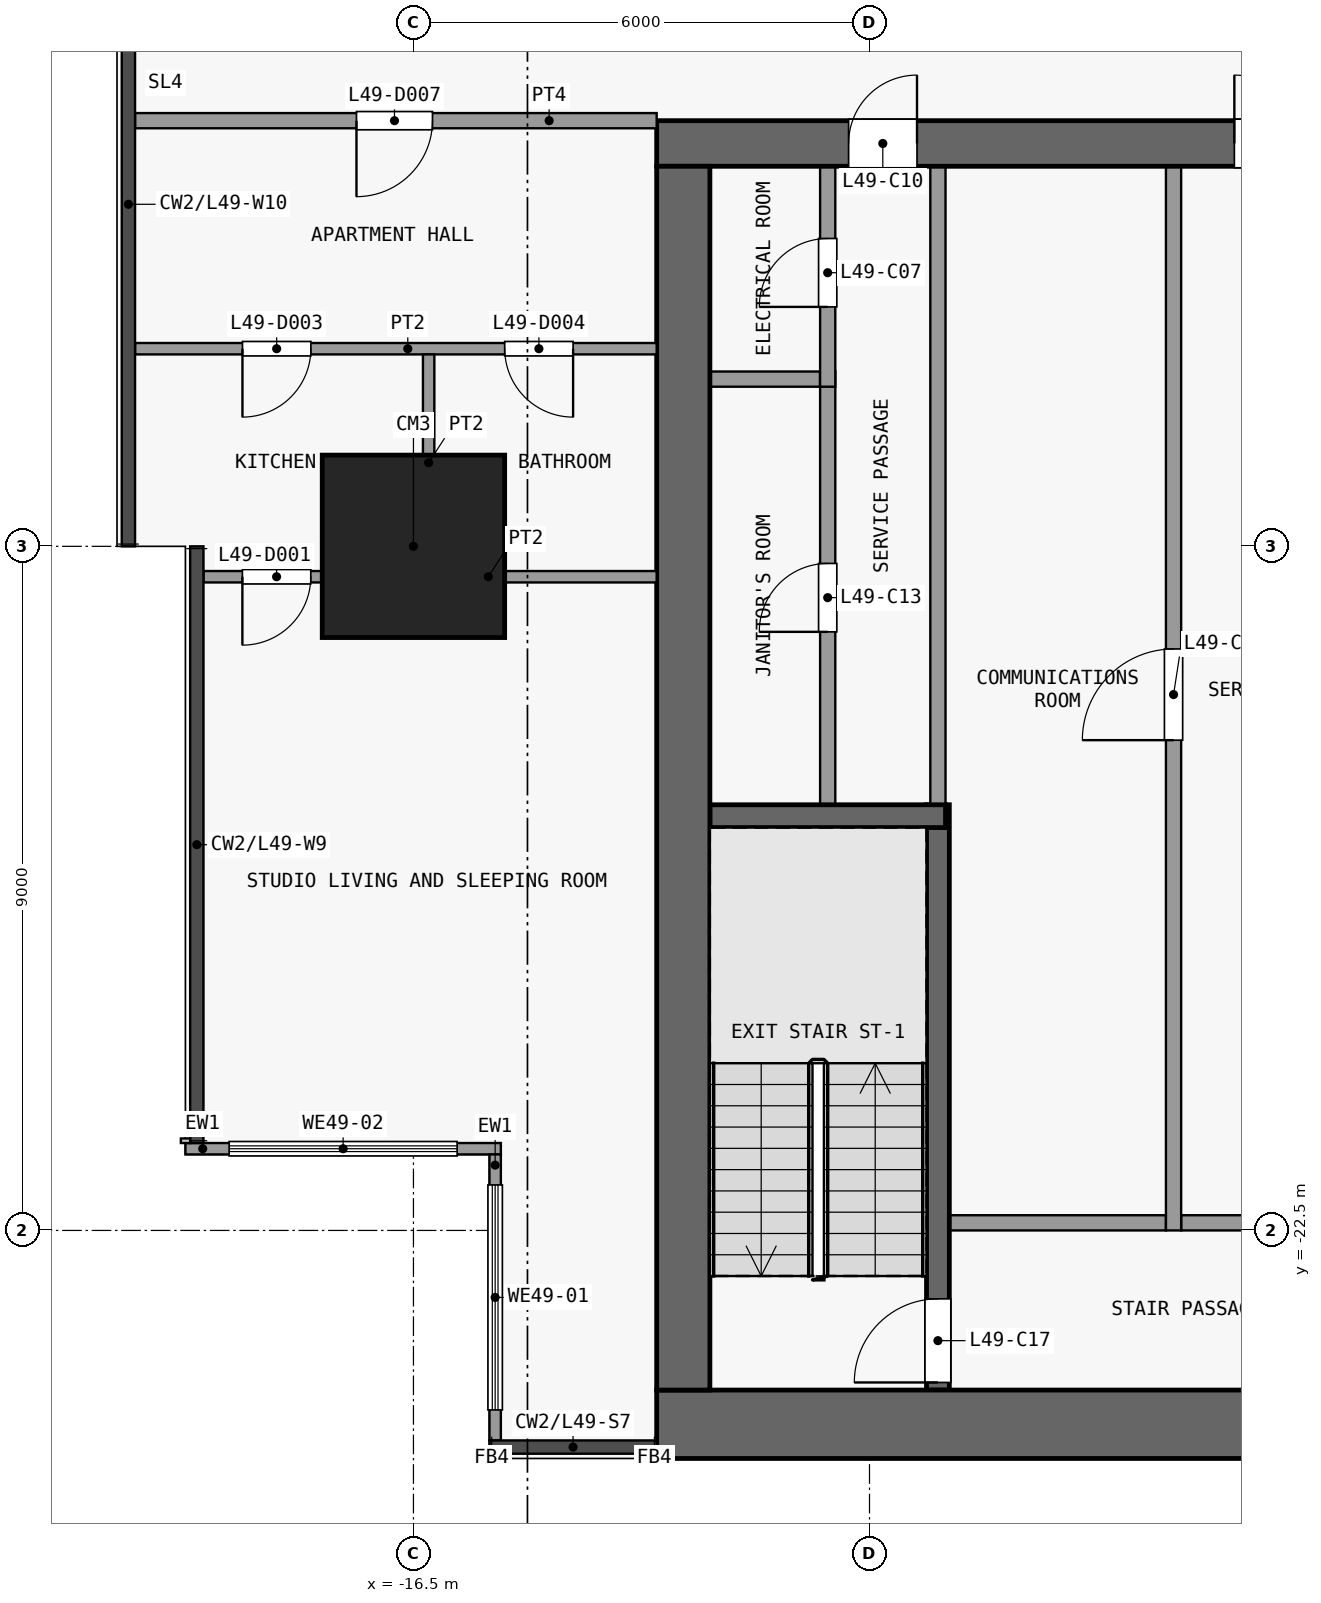
"""IFC4 building model, lengths in metres.
Left out: names, types, materials, properties, quantities, classifications, styles, units other than length and angle.
Written with IfcOpenShell. Run it as: python <this file> out.ifc"""

import sys

from ifc_helpers import new_model, si_unit, direction, frame, frame_2d, origin, origin_2d, place, context, subcontext, project, spatial, rectangle, extrude, element, fill, save


model = new_model("IFC4")
c1 = context("Model", 3, precision=1e-05, world=origin(), true_north=direction((0.0, 1.0)))
c2 = subcontext(c1, "Body", "Model", "MODEL_VIEW")
j1 = project(units=[si_unit("LENGTHUNIT", "METRE"), si_unit("PLANEANGLEUNIT", "RADIAN")], contexts=[c1])
p1 = place(None, origin())
s1 = spatial("IfcSite", under=j1, at=p1, CompositionType="ELEMENT")
p2 = place(p1, origin())
s2 = spatial("IfcBuilding", under=s1, at=p2, CompositionType="ELEMENT")
p3 = place(p2, frame((0.0, 0.0, 196.1)))
s3 = spatial("IfcBuildingStorey", under=s2, at=p3, CompositionType="ELEMENT", Elevation=196.1)
p4 = place(p3, frame((-16.5, -13.5, 0.0), z_axis=(0.0, 0.0, 1.0), x_axis=(1.0, 0.0, 0.0)))
e1 = element("IfcColumn", 1, at=p4, inside=s3, PredefinedType="COLUMN", context=c2, shape_type="SweptSolid", body=[
    extrude(rectangle(XDim=2.4, YDim=2.4, at=origin_2d()), origin(), (0.0, 0.0, 1.0), 3.6),
])
p5 = place(p3, frame((-13.3, -25.05, 0.0), z_axis=(0.0, 0.0, 1.0), x_axis=(1.0, 0.0, 0.0)))
e2 = element("IfcWall", 2, at=p5, inside=s3, PredefinedType="SHEAR", context=c2, shape_type="SweptSolid", body=[
    extrude(rectangle(XDim=26.6, YDim=0.9, at=frame_2d((13.3, 0.0))), origin(), (0.0, 0.0, 1.0), 3.15),
])
p6 = place(p3, frame((-13.3, -8.2, 0.0), z_axis=(0.0, 0.0, 1.0), x_axis=(1.0, 0.0, 0.0)))
e3 = element("IfcWall", 3, at=p6, inside=s3, PredefinedType="SHEAR", context=c2, shape_type="SweptSolid", body=[
    extrude(rectangle(XDim=26.6, YDim=0.6, at=frame_2d((13.3, 0.0))), origin(), (0.0, 0.0, 1.0), 3.15),
])
p7 = place(p6, frame((7.6, 0.0, 0.0)))
e4 = element("IfcOpeningElement", 4, at=p7, cuts=e3, PredefinedType="OPENING", context=c2, shape_type="SweptSolid", body=[
    extrude(rectangle(XDim=1.8, YDim=2.1, at=frame_2d((0.9, 1.05))), frame((0.0, 0.31, 0.0), z_axis=(0.0, -1.0, 0.0), x_axis=(1.0, 0.0, 0.0)), (0.0, 0.0, 1.0), 0.62),
])
p8 = place(p6, frame((17.2, 0.0, 0.0)))
e5 = element("IfcOpeningElement", 5, at=p8, cuts=e3, PredefinedType="OPENING", context=c2, shape_type="SweptSolid", body=[
    extrude(rectangle(XDim=1.8, YDim=2.1, at=frame_2d((0.9, 1.05))), frame((0.0, 0.31, 0.0), z_axis=(0.0, -1.0, 0.0), x_axis=(1.0, 0.0, 0.0)), (0.0, 0.0, 1.0), 0.62),
])
p9 = place(p6, frame((2.525, 0.0, 0.0)))
e6 = element("IfcOpeningElement", 6, at=p9, cuts=e3, PredefinedType="OPENING", context=c2, shape_type="SweptSolid", body=[
    extrude(rectangle(XDim=0.9, YDim=2.1, at=frame_2d((0.45, 1.05))), frame((0.0, 0.31, 0.0), z_axis=(0.0, -1.0, 0.0), x_axis=(1.0, 0.0, 0.0)), (0.0, 0.0, 1.0), 0.62),
])
p10 = place(p6, frame((23.175, 0.0, 0.0)))
e7 = element("IfcOpeningElement", 7, at=p10, cuts=e3, PredefinedType="OPENING", context=c2, shape_type="SweptSolid", body=[
    extrude(rectangle(XDim=0.9, YDim=2.1, at=frame_2d((0.45, 1.05))), frame((0.0, 0.31, 0.0), z_axis=(0.0, -1.0, 0.0), x_axis=(1.0, 0.0, 0.0)), (0.0, 0.0, 1.0), 0.62),
])
p11 = place(p3, frame((-12.95, -24.6, 0.0), z_axis=(0.0, 0.0, 1.0), x_axis=(0.0, 1.0, 0.0)))
e8 = element("IfcWall", 8, at=p11, inside=s3, PredefinedType="SHEAR", context=c2, shape_type="SweptSolid", body=[
    extrude(rectangle(XDim=16.1, YDim=0.7, at=frame_2d((8.05, 0.0))), origin(), (0.0, 0.0, 1.0), 3.15),
])
p12 = place(p3, frame((-9.45, -22.4, 0.0), z_axis=(0.0, 0.0, 1.0), x_axis=(1.0, 0.0, 0.0)))
e9 = element("IfcWall", 9, at=p12, inside=s3, PredefinedType="PARTITIONING", context=c2, shape_type="SweptSolid", body=[
    extrude(rectangle(XDim=2.85, YDim=0.2, at=frame_2d((1.425, 0.0))), origin(), (0.0, 0.0, 1.0), 3.15),
])
p13 = place(p3, frame((-3.25, -22.4, 0.0), z_axis=(0.0, 0.0, 1.0), x_axis=(-1.0, 0.0, 0.0)))
e10 = element("IfcWall", 10, at=p13, inside=s3, PredefinedType="PARTITIONING", context=c2, shape_type="SweptSolid", body=[
    extrude(rectangle(XDim=3.15, YDim=0.2, at=frame_2d((1.575, 0.0))), origin(), (0.0, 0.0, 1.0), 3.15),
])
p14 = place(p13, frame((0.8, 0.0, 0.0)))
e11 = element("IfcOpeningElement", 11, at=p14, cuts=e10, PredefinedType="OPENING", context=c2, shape_type="SweptSolid", body=[
    extrude(rectangle(XDim=1.5, YDim=2.1, at=frame_2d((0.75, 1.05))), frame((0.0, 0.11, 0.0), z_axis=(0.0, -1.0, 0.0), x_axis=(1.0, 0.0, 0.0)), (0.0, 0.0, 1.0), 0.22),
])
p15 = place(p3, frame((-12.6, -17.05, 0.0), z_axis=(0.0, 0.0, 1.0), x_axis=(1.0, 0.0, 0.0)))
e12 = element("IfcWall", 12, at=p15, inside=s3, PredefinedType="SHEAR", context=c2, shape_type="SweptSolid", body=[
    extrude(rectangle(XDim=3.1, YDim=0.3, at=frame_2d((1.55, 0.0))), origin(), (0.0, 0.0, 1.0), 3.15),
])
p16 = place(p3, frame((-12.6, -11.3, 0.0), z_axis=(0.0, 0.0, 1.0), x_axis=(1.0, 0.0, 0.0)))
e13 = element("IfcWall", 13, at=p16, inside=s3, PredefinedType="PARTITIONING", context=c2, shape_type="SweptSolid", body=[
    extrude(rectangle(XDim=1.45, YDim=0.2, at=frame_2d((0.725, 0.0))), origin(), (0.0, 0.0, 1.0), 3.15),
])
p17 = place(p3, frame((-11.05, -16.9, 0.0), z_axis=(0.0, 0.0, 1.0), x_axis=(0.0, 1.0, 0.0)))
e14 = element("IfcWall", 14, at=p17, inside=s3, PredefinedType="PARTITIONING", context=c2, shape_type="SweptSolid", body=[
    extrude(rectangle(XDim=5.7, YDim=0.2, at=frame_2d((2.85, 0.0))), origin(), (0.0, 0.0, 1.0), 3.15),
])
p18 = place(p17, frame((2.275, 0.0, 0.0)))
e15 = element("IfcOpeningElement", 15, at=p18, cuts=e14, PredefinedType="OPENING", context=c2, shape_type="SweptSolid", body=[
    extrude(rectangle(XDim=0.9, YDim=2.1, at=frame_2d((0.45, 1.05))), frame((0.0, 0.11, 0.0), z_axis=(0.0, -1.0, 0.0), x_axis=(1.0, 0.0, 0.0)), (0.0, 0.0, 1.0), 0.22),
])
p19 = place(p3, frame((-11.05, -11.4, 0.0), z_axis=(0.0, 0.0, 1.0), x_axis=(0.0, 1.0, 0.0)))
e16 = element("IfcWall", 16, at=p19, inside=s3, PredefinedType="PARTITIONING", context=c2, shape_type="SweptSolid", body=[
    extrude(rectangle(XDim=2.9, YDim=0.2, at=frame_2d((1.45, 0.0))), origin(), (0.0, 0.0, 1.0), 3.15),
])
p20 = place(p19, frame((1.05, 0.0, 0.0)))
e17 = element("IfcOpeningElement", 17, at=p20, cuts=e16, PredefinedType="OPENING", context=c2, shape_type="SweptSolid", body=[
    extrude(rectangle(XDim=0.9, YDim=2.1, at=frame_2d((0.45, 1.05))), frame((0.0, 0.11, 0.0), z_axis=(0.0, -1.0, 0.0), x_axis=(1.0, 0.0, 0.0)), (0.0, 0.0, 1.0), 0.22),
])
p21 = place(p3, frame((-9.6, -24.6, 0.0), z_axis=(0.0, 0.0, 1.0), x_axis=(0.0, 1.0, 0.0)))
e18 = element("IfcWall", 18, at=p21, inside=s3, PredefinedType="SHEAR", context=c2, shape_type="SweptSolid", body=[
    extrude(rectangle(XDim=7.7, YDim=0.3, at=frame_2d((3.85, 0.0))), origin(), (0.0, 0.0, 1.0), 3.15),
])
p22 = place(p21, frame((0.1, 0.0, 0.0)))
e19 = element("IfcOpeningElement", 19, at=p22, cuts=e18, PredefinedType="OPENING", context=c2, shape_type="SweptSolid", body=[
    extrude(rectangle(XDim=1.1, YDim=2.1, at=frame_2d((0.55, 1.05))), frame((0.0, 0.16, 0.0), z_axis=(0.0, -1.0, 0.0), x_axis=(1.0, 0.0, 0.0)), (0.0, 0.0, 1.0), 0.32),
])
p23 = place(p3, frame((-9.6, -16.9, 0.0), z_axis=(0.0, 0.0, 1.0), x_axis=(0.0, 1.0, 0.0)))
e20 = element("IfcWall", 20, at=p23, inside=s3, PredefinedType="PARTITIONING", context=c2, shape_type="SweptSolid", body=[
    extrude(rectangle(XDim=8.4, YDim=0.2, at=frame_2d((4.2, 0.0))), origin(), (0.0, 0.0, 1.0), 3.15),
])
p24 = place(p3, frame((-6.5, -22.5, 0.0), z_axis=(0.0, 0.0, 1.0), x_axis=(0.0, 1.0, 0.0)))
e21 = element("IfcWall", 21, at=p24, inside=s3, PredefinedType="PARTITIONING", context=c2, shape_type="SweptSolid", body=[
    extrude(rectangle(XDim=14.0, YDim=0.2, at=frame_2d((7.0, 0.0))), origin(), (0.0, 0.0, 1.0), 3.15),
])
p25 = place(p24, frame((6.45, 0.0, 0.0)))
e22 = element("IfcOpeningElement", 22, at=p25, cuts=e21, PredefinedType="OPENING", context=c2, shape_type="SweptSolid", body=[
    extrude(rectangle(XDim=1.2, YDim=2.1, at=frame_2d((0.6, 1.05))), frame((0.0, 0.11, 0.0), z_axis=(0.0, -1.0, 0.0), x_axis=(1.0, 0.0, 0.0)), (0.0, 0.0, 1.0), 0.22),
])
p26 = place(p3, frame((-15.425, -25.262, 0.0), z_axis=(0.0, 0.0, 1.0), x_axis=(0.0, 1.0, 0.0)))
e23 = element("IfcWall", 23, at=p26, inside=s3, PredefinedType="SOLIDWALL", context=c2, shape_type="SweptSolid", body=[
    extrude(rectangle(XDim=3.762, YDim=0.15, at=frame_2d((1.881, 0.0))), origin(), (0.0, 0.0, 1.0), 3.15),
])
p27 = place(p26, frame((0.401, 0.0, 0.9)))
e24 = element("IfcOpeningElement", 24, at=p27, cuts=e23, PredefinedType="OPENING", context=c2, shape_type="SweptSolid", body=[
    extrude(rectangle(XDim=2.96, YDim=2.4, at=frame_2d((1.48, 1.2))), frame((0.0, 0.085, 0.0), z_axis=(0.0, -1.0, 0.0), x_axis=(1.0, 0.0, 0.0)), (0.0, 0.0, 1.0), 0.17),
])
p28 = place(p3, frame((-15.35, -21.425, 0.0), z_axis=(0.0, 0.0, 1.0), x_axis=(-1.0, 0.0, 0.0)))
e25 = element("IfcWall", 25, at=p28, inside=s3, PredefinedType="SOLIDWALL", context=c2, shape_type="SweptSolid", body=[
    extrude(rectangle(XDim=4.15, YDim=0.15, at=frame_2d((2.075, 0.0))), origin(), (0.0, 0.0, 1.0), 3.15),
])
p29 = place(p28, frame((0.575, 0.0, 0.9)))
e26 = element("IfcOpeningElement", 26, at=p29, cuts=e25, PredefinedType="OPENING", context=c2, shape_type="SweptSolid", body=[
    extrude(rectangle(XDim=3.0, YDim=2.4, at=frame_2d((1.5, 1.2))), frame((0.0, 0.085, 0.0), z_axis=(0.0, -1.0, 0.0), x_axis=(1.0, 0.0, 0.0)), (0.0, 0.0, 1.0), 0.17),
])
p30 = place(p3, frame((-19.262, -13.9, 0.0), z_axis=(0.0, 0.0, 1.0), x_axis=(1.0, 0.0, 0.0)))
e27 = element("IfcWall", 27, at=p30, inside=s3, PredefinedType="PARTITIONING", context=c2, shape_type="SweptSolid", body=[
    extrude(rectangle(XDim=5.962, YDim=0.15, at=frame_2d((2.981, 0.0))), origin(), (0.0, 0.0, 1.0), 3.15),
])
p31 = place(p30, frame((0.512, 0.0, 0.0)))
e28 = element("IfcOpeningElement", 28, at=p31, cuts=e27, PredefinedType="OPENING", context=c2, shape_type="SweptSolid", body=[
    extrude(rectangle(XDim=0.9, YDim=2.1, at=frame_2d((0.45, 1.05))), frame((0.0, 0.085, 0.0), z_axis=(0.0, -1.0, 0.0), x_axis=(1.0, 0.0, 0.0)), (0.0, 0.0, 1.0), 0.17),
])
p32 = place(p3, frame((-20.163, -10.9, 0.0), z_axis=(0.0, 0.0, 1.0), x_axis=(1.0, 0.0, 0.0)))
e29 = element("IfcWall", 29, at=p32, inside=s3, PredefinedType="PARTITIONING", context=c2, shape_type="SweptSolid", body=[
    extrude(rectangle(XDim=6.863, YDim=0.15, at=frame_2d((3.431, 0.0))), origin(), (0.0, 0.0, 1.0), 3.15),
])
p33 = place(p32, frame((1.413, 0.0, 0.0)))
e30 = element("IfcOpeningElement", 30, at=p33, cuts=e29, PredefinedType="OPENING", context=c2, shape_type="SweptSolid", body=[
    extrude(rectangle(XDim=0.9, YDim=2.1, at=frame_2d((0.45, 1.05))), frame((0.0, 0.085, 0.0), z_axis=(0.0, -1.0, 0.0), x_axis=(1.0, 0.0, 0.0)), (0.0, 0.0, 1.0), 0.17),
])
p34 = place(p32, frame((4.863, 0.0, 0.0)))
e31 = element("IfcOpeningElement", 31, at=p34, cuts=e29, PredefinedType="OPENING", context=c2, shape_type="SweptSolid", body=[
    extrude(rectangle(XDim=0.9, YDim=2.1, at=frame_2d((0.45, 1.05))), frame((0.0, 0.085, 0.0), z_axis=(0.0, -1.0, 0.0), x_axis=(1.0, 0.0, 0.0)), (0.0, 0.0, 1.0), 0.17),
])
p35 = place(p3, frame((-20.163, -7.9, 0.0), z_axis=(0.0, 0.0, 1.0), x_axis=(1.0, 0.0, 0.0)))
e32 = element("IfcWall", 32, at=p35, inside=s3, PredefinedType="PARTITIONING", context=c2, shape_type="SweptSolid", body=[
    extrude(rectangle(XDim=6.863, YDim=0.2, at=frame_2d((3.431, 0.0))), origin(), (0.0, 0.0, 1.0), 3.15),
])
p36 = place(p35, frame((2.913, 0.0, 0.0)))
e33 = element("IfcOpeningElement", 33, at=p36, cuts=e32, PredefinedType="OPENING", context=c2, shape_type="SweptSolid", body=[
    extrude(rectangle(XDim=1.0, YDim=2.1, at=frame_2d((0.5, 1.05))), frame((0.0, 0.11, 0.0), z_axis=(0.0, -1.0, 0.0), x_axis=(1.0, 0.0, 0.0)), (0.0, 0.0, 1.0), 0.22),
])
p37 = place(p3, frame((-16.3, -13.825, 0.0), z_axis=(0.0, 0.0, 1.0), x_axis=(0.0, 1.0, 0.0)))
e34 = element("IfcWall", 34, at=p37, inside=s3, PredefinedType="PARTITIONING", context=c2, shape_type="SweptSolid", body=[
    extrude(rectangle(XDim=2.85, YDim=0.15, at=frame_2d((1.425, 0.0))), origin(), (0.0, 0.0, 1.0), 3.15),
])
p38 = place(p7, origin())
e35 = element("IfcDoor", 35, at=p38, inside=s3, OperationType="DOUBLE_DOOR_SINGLE_SWING", PredefinedType="DOOR", context=c2, shape_type="SweptSolid", body=[
    extrude(rectangle(XDim=1.8, YDim=2.1, at=frame_2d((0.9, 1.05))), frame((0.0, 0.025, 0.0), z_axis=(0.0, -1.0, 0.0), x_axis=(1.0, 0.0, 0.0)), (0.0, 0.0, 1.0), 0.05),
])
fill(e4, e35)
p39 = place(p20, origin())
e36 = element("IfcDoor", 36, at=p39, inside=s3, OperationType="SINGLE_SWING_LEFT", PredefinedType="DOOR", context=c2, shape_type="SweptSolid", body=[
    extrude(rectangle(XDim=0.9, YDim=2.1, at=frame_2d((0.45, 1.05))), frame((0.0, 0.025, 0.0), z_axis=(0.0, -1.0, 0.0), x_axis=(1.0, 0.0, 0.0)), (0.0, 0.0, 1.0), 0.05),
])
fill(e17, e36)
p40 = place(p25, origin())
e37 = element("IfcDoor", 37, at=p40, inside=s3, OperationType="SINGLE_SWING_LEFT", PredefinedType="DOOR", context=c2, shape_type="SweptSolid", body=[
    extrude(rectangle(XDim=1.2, YDim=2.1, at=frame_2d((0.6, 1.05))), frame((0.0, 0.025, 0.0), z_axis=(0.0, -1.0, 0.0), x_axis=(1.0, 0.0, 0.0)), (0.0, 0.0, 1.0), 0.05),
])
fill(e22, e37)
p41 = place(p9, origin())
e38 = element("IfcDoor", 38, at=p41, inside=s3, OperationType="SINGLE_SWING_RIGHT", PredefinedType="DOOR", context=c2, shape_type="SweptSolid", body=[
    extrude(rectangle(XDim=0.9, YDim=2.1, at=frame_2d((0.45, 1.05))), frame((0.0, 0.025, 0.0), z_axis=(0.0, -1.0, 0.0), x_axis=(1.0, 0.0, 0.0)), (0.0, 0.0, 1.0), 0.05),
])
fill(e6, e38)
p42 = place(p18, origin())
e39 = element("IfcDoor", 39, at=p42, inside=s3, OperationType="SINGLE_SWING_LEFT", PredefinedType="DOOR", context=c2, shape_type="SweptSolid", body=[
    extrude(rectangle(XDim=0.9, YDim=2.1, at=frame_2d((0.45, 1.05))), frame((0.0, 0.025, 0.0), z_axis=(0.0, -1.0, 0.0), x_axis=(1.0, 0.0, 0.0)), (0.0, 0.0, 1.0), 0.05),
])
fill(e15, e39)
p43 = place(p22, origin())
e40 = element("IfcDoor", 40, at=p43, inside=s3, OperationType="SINGLE_SWING_LEFT", PredefinedType="DOOR", context=c2, shape_type="SweptSolid", body=[
    extrude(rectangle(XDim=1.1, YDim=2.1, at=frame_2d((0.55, 1.05))), frame((0.0, 0.025, 0.0), z_axis=(0.0, -1.0, 0.0), x_axis=(1.0, 0.0, 0.0)), (0.0, 0.0, 1.0), 0.05),
])
fill(e19, e40)
p44 = place(p27, origin())
e41 = element("IfcWindow", 41, at=p44, inside=s3, PartitioningType="SINGLE_PANEL", PredefinedType="WINDOW", context=c2, shape_type="SweptSolid", body=[
    extrude(rectangle(XDim=2.96, YDim=2.4, at=frame_2d((1.48, 1.2))), frame((0.0, 0.03, 0.0), z_axis=(0.0, -1.0, 0.0), x_axis=(1.0, 0.0, 0.0)), (0.0, 0.0, 1.0), 0.06),
])
fill(e24, e41)
p45 = place(p29, origin())
e42 = element("IfcWindow", 42, at=p45, inside=s3, PartitioningType="SINGLE_PANEL", PredefinedType="WINDOW", context=c2, shape_type="SweptSolid", body=[
    extrude(rectangle(XDim=3.0, YDim=2.4, at=frame_2d((1.5, 1.2))), frame((0.0, 0.03, 0.0), z_axis=(0.0, -1.0, 0.0), x_axis=(1.0, 0.0, 0.0)), (0.0, 0.0, 1.0), 0.06),
])
fill(e26, e42)
p46 = place(p31, origin())
e43 = element("IfcDoor", 43, at=p46, inside=s3, OperationType="SINGLE_SWING_LEFT", PredefinedType="DOOR", context=c2, shape_type="SweptSolid", body=[
    extrude(rectangle(XDim=0.9, YDim=2.1, at=frame_2d((0.45, 1.05))), frame((0.0, 0.025, 0.0), z_axis=(0.0, -1.0, 0.0), x_axis=(1.0, 0.0, 0.0)), (0.0, 0.0, 1.0), 0.05),
])
fill(e28, e43)
p47 = place(p33, origin())
e44 = element("IfcDoor", 44, at=p47, inside=s3, OperationType="SINGLE_SWING_LEFT", PredefinedType="DOOR", context=c2, shape_type="SweptSolid", body=[
    extrude(rectangle(XDim=0.9, YDim=2.1, at=frame_2d((0.45, 1.05))), frame((0.0, 0.025, 0.0), z_axis=(0.0, -1.0, 0.0), x_axis=(1.0, 0.0, 0.0)), (0.0, 0.0, 1.0), 0.05),
])
fill(e30, e44)
p48 = place(p34, origin())
e45 = element("IfcDoor", 45, at=p48, inside=s3, OperationType="SINGLE_SWING_RIGHT", PredefinedType="DOOR", context=c2, shape_type="SweptSolid", body=[
    extrude(rectangle(XDim=0.9, YDim=2.1, at=frame_2d((0.45, 1.05))), frame((0.0, 0.025, 0.0), z_axis=(0.0, -1.0, 0.0), x_axis=(1.0, 0.0, 0.0)), (0.0, 0.0, 1.0), 0.05),
])
fill(e31, e45)
p49 = place(p36, origin())
e46 = element("IfcDoor", 46, at=p49, inside=s3, OperationType="SINGLE_SWING_LEFT", PredefinedType="DOOR", context=c2, shape_type="SweptSolid", body=[
    extrude(rectangle(XDim=1.0, YDim=2.1, at=frame_2d((0.5, 1.05))), frame((0.0, 0.025, 0.0), z_axis=(0.0, -1.0, 0.0), x_axis=(1.0, 0.0, 0.0)), (0.0, 0.0, 1.0), 0.05),
])
fill(e33, e46)
save(model, sys.argv[1])
